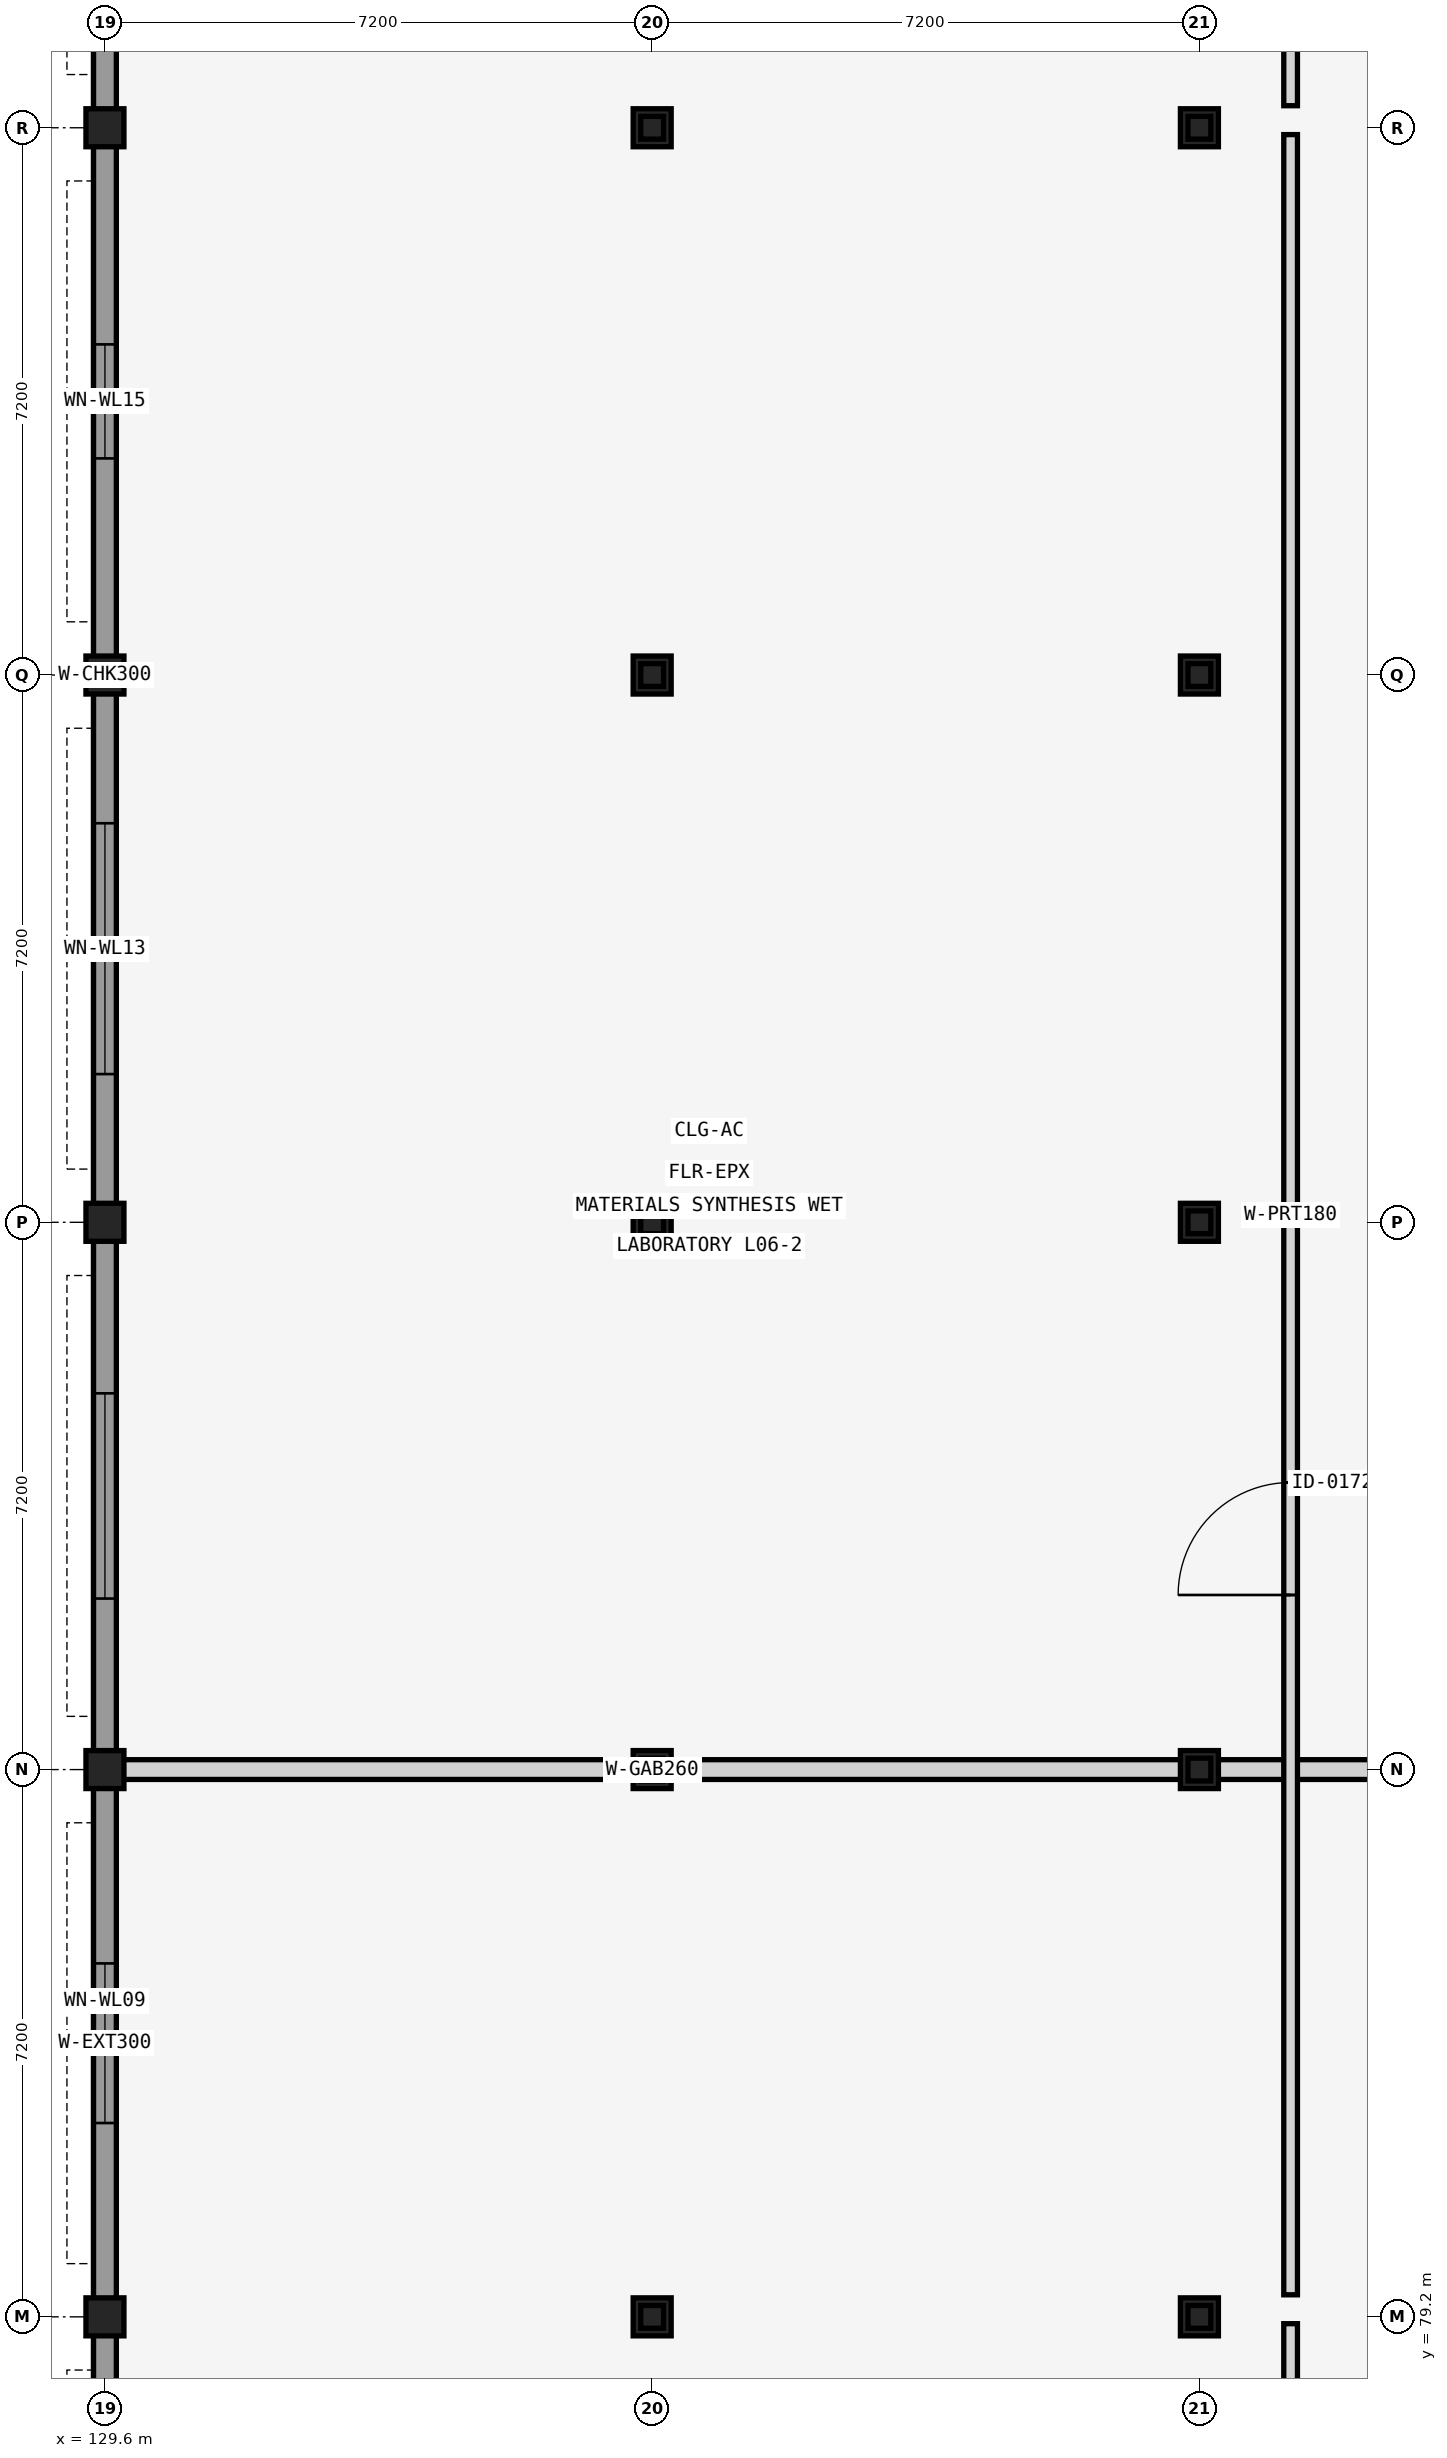
"""IFC4 building model, lengths in metres.
Left out: names, types, materials, properties, quantities, classifications, styles, units other than length and angle.
Written with IfcOpenShell. Run it as: python <this file> out.ifc"""

import sys

from ifc_helpers import new_model, si_unit, direction, frame, frame_2d, origin, origin_2d, place, context, subcontext, project, spatial, polyline, rectangle, i_section, outline, extrude, element, fill, save


model = new_model("IFC4")
c1 = context("Model", 3, precision=1e-05, world=origin(), true_north=direction((0.0, 1.0)))
c2 = subcontext(c1, "Body", "Model", "MODEL_VIEW")
j1 = project(units=[si_unit("LENGTHUNIT", "METRE"), si_unit("PLANEANGLEUNIT", "RADIAN")], contexts=[c1])
p1 = place(None, origin())
s1 = spatial("IfcSite", under=j1, at=p1, CompositionType="ELEMENT")
p2 = place(p1, origin())
s2 = spatial("IfcBuilding", under=s1, at=p2, CompositionType="ELEMENT")
p3 = place(p2, frame((0.0, 0.0, 25.6)))
s3 = spatial("IfcBuildingStorey", under=s2, at=p3, CompositionType="ELEMENT", Elevation=25.6)
for number, where, z_axis, x_axis in (
    (1, (129.6, 79.2, 0.0), (0.0, 0.0, 1.0), (1.0, 0.0, 0.0)),
    (2, (129.6, 86.4, 0.0), (0.0, 0.0, 1.0), (1.0, 0.0, 0.0)),
    (3, (129.6, 93.6, 0.0), (0.0, 0.0, 1.0), (1.0, 0.0, 0.0)),
    (4, (129.6, 100.8, 0.0), (0.0, 0.0, 1.0), (1.0, 0.0, 0.0)),
    (5, (129.6, 108.0, 0.0), (0.0, 0.0, 1.0), (1.0, 0.0, 0.0)),
    (6, (136.8, 79.2, 0.0), (0.0, 0.0, 1.0), (1.0, 0.0, 0.0)),
    (7, (136.8, 86.4, 0.0), (0.0, 0.0, 1.0), (1.0, 0.0, 0.0)),
    (8, (136.8, 93.6, 0.0), (0.0, 0.0, 1.0), (1.0, 0.0, 0.0)),
    (9, (136.8, 100.8, 0.0), (0.0, 0.0, 1.0), (1.0, 0.0, 0.0)),
    (10, (136.8, 108.0, 0.0), (0.0, 0.0, 1.0), (1.0, 0.0, 0.0)),
    (11, (144.0, 79.2, 0.0), (0.0, 0.0, 1.0), (1.0, 0.0, 0.0)),
    (12, (144.0, 86.4, 0.0), (0.0, 0.0, 1.0), (1.0, 0.0, 0.0)),
    (13, (144.0, 93.6, 0.0), (0.0, 0.0, 1.0), (1.0, 0.0, 0.0)),
    (14, (144.0, 100.8, 0.0), (0.0, 0.0, 1.0), (1.0, 0.0, 0.0)),
    (15, (144.0, 108.0, 0.0), (0.0, 0.0, 1.0), (1.0, 0.0, 0.0)),
):
    element("IfcColumn", number, at=place(p3, frame(where, z_axis=z_axis, x_axis=x_axis)), inside=s3, PredefinedType="COLUMN", context=c2, shape_type="SweptSolid", body=[
        extrude(rectangle(XDim=0.5, YDim=0.5, at=origin_2d()), origin(), (0.0, 0.0, 1.0), 4.16),
    ])
p4 = place(p3, frame((136.8, 79.2, 4.16), z_axis=(0.0, 0.0, 1.0), x_axis=(1.0, 0.0, 0.0)))
e16 = element("IfcColumn", 16, at=p4, inside=s3, PredefinedType="COLUMN", context=c2, shape_type="SweptSolid", body=[
    extrude(i_section(OverallWidth=0.3, OverallDepth=0.3, WebThickness=0.011, FlangeThickness=0.019, FilletRadius=0.027, at=origin_2d()), origin(), (0.0, 0.0, 1.0), 2.06),
])
p5 = place(p3, frame((136.8, 86.4, 4.16), z_axis=(0.0, 0.0, 1.0), x_axis=(1.0, 0.0, 0.0)))
e17 = element("IfcColumn", 17, at=p5, inside=s3, PredefinedType="COLUMN", context=c2, shape_type="SweptSolid", body=[
    extrude(i_section(OverallWidth=0.3, OverallDepth=0.3, WebThickness=0.011, FlangeThickness=0.019, FilletRadius=0.027, at=origin_2d()), origin(), (0.0, 0.0, 1.0), 2.84),
])
p6 = place(p3, frame((144.0, 79.2, 4.16), z_axis=(0.0, 0.0, 1.0), x_axis=(1.0, 0.0, 0.0)))
e18 = element("IfcColumn", 18, at=p6, inside=s3, PredefinedType="COLUMN", context=c2, shape_type="SweptSolid", body=[
    extrude(i_section(OverallWidth=0.3, OverallDepth=0.3, WebThickness=0.011, FlangeThickness=0.019, FilletRadius=0.027, at=origin_2d()), origin(), (0.0, 0.0, 1.0), 2.06),
])
p7 = place(p3, frame((144.0, 86.4, 4.16), z_axis=(0.0, 0.0, 1.0), x_axis=(1.0, 0.0, 0.0)))
e19 = element("IfcColumn", 19, at=p7, inside=s3, PredefinedType="COLUMN", context=c2, shape_type="SweptSolid", body=[
    extrude(i_section(OverallWidth=0.3, OverallDepth=0.3, WebThickness=0.011, FlangeThickness=0.019, FilletRadius=0.027, at=origin_2d()), origin(), (0.0, 0.0, 1.0), 2.84),
])
p8 = place(p3, frame((136.8, 93.6, 4.16), z_axis=(0.0, 0.0, 1.0), x_axis=(1.0, 0.0, 0.0)))
e20 = element("IfcColumn", 20, at=p8, inside=s3, PredefinedType="COLUMN", context=c2, shape_type="SweptSolid", body=[
    extrude(i_section(OverallWidth=0.3, OverallDepth=0.3, WebThickness=0.011, FlangeThickness=0.019, FilletRadius=0.027, at=origin_2d()), origin(), (0.0, 0.0, 1.0), 0.5),
])
p9 = place(p3, frame((136.8, 100.8, 4.16), z_axis=(0.0, 0.0, 1.0), x_axis=(1.0, 0.0, 0.0)))
e21 = element("IfcColumn", 21, at=p9, inside=s3, PredefinedType="COLUMN", context=c2, shape_type="SweptSolid", body=[
    extrude(i_section(OverallWidth=0.3, OverallDepth=0.3, WebThickness=0.011, FlangeThickness=0.019, FilletRadius=0.027, at=origin_2d()), origin(), (0.0, 0.0, 1.0), 1.28),
])
p10 = place(p3, frame((136.8, 108.0, 4.16), z_axis=(0.0, 0.0, 1.0), x_axis=(1.0, 0.0, 0.0)))
e22 = element("IfcColumn", 22, at=p10, inside=s3, PredefinedType="COLUMN", context=c2, shape_type="SweptSolid", body=[
    extrude(i_section(OverallWidth=0.3, OverallDepth=0.3, WebThickness=0.011, FlangeThickness=0.019, FilletRadius=0.027, at=origin_2d()), origin(), (0.0, 0.0, 1.0), 2.06),
])
p11 = place(p3, frame((144.0, 93.6, 4.16), z_axis=(0.0, 0.0, 1.0), x_axis=(1.0, 0.0, 0.0)))
e23 = element("IfcColumn", 23, at=p11, inside=s3, PredefinedType="COLUMN", context=c2, shape_type="SweptSolid", body=[
    extrude(i_section(OverallWidth=0.3, OverallDepth=0.3, WebThickness=0.011, FlangeThickness=0.019, FilletRadius=0.027, at=origin_2d()), origin(), (0.0, 0.0, 1.0), 0.5),
])
p12 = place(p3, frame((144.0, 100.8, 4.16), z_axis=(0.0, 0.0, 1.0), x_axis=(1.0, 0.0, 0.0)))
e24 = element("IfcColumn", 24, at=p12, inside=s3, PredefinedType="COLUMN", context=c2, shape_type="SweptSolid", body=[
    extrude(i_section(OverallWidth=0.3, OverallDepth=0.3, WebThickness=0.011, FlangeThickness=0.019, FilletRadius=0.027, at=origin_2d()), origin(), (0.0, 0.0, 1.0), 1.28),
])
p13 = place(p3, frame((144.0, 108.0, 4.16), z_axis=(0.0, 0.0, 1.0), x_axis=(1.0, 0.0, 0.0)))
e25 = element("IfcColumn", 25, at=p13, inside=s3, PredefinedType="COLUMN", context=c2, shape_type="SweptSolid", body=[
    extrude(i_section(OverallWidth=0.3, OverallDepth=0.3, WebThickness=0.011, FlangeThickness=0.019, FilletRadius=0.027, at=origin_2d()), origin(), (0.0, 0.0, 1.0), 2.06),
])
p14 = place(p3, frame((129.6, 72.24, 0.0), z_axis=(0.0, 0.0, 1.0), x_axis=(0.0, 1.0, 0.0)))
e26 = element("IfcWall", 26, at=p14, inside=s3, PredefinedType="SOLIDWALL", context=c2, shape_type="SweptSolid", body=[
    extrude(rectangle(XDim=6.72, YDim=0.3, at=frame_2d((3.36, 0.0))), origin(), (0.0, 0.0, 1.0), 3.55),
])
p15 = place(p14, frame((1.56, 0.0, 0.68)))
e27 = element("IfcOpeningElement", 27, at=p15, cuts=e26, PredefinedType="OPENING", context=c2, shape_type="SweptSolid", body=[
    extrude(rectangle(XDim=3.6, YDim=2.1, at=frame_2d((1.8, 1.05))), frame((0.0, 0.16, 0.0), z_axis=(0.0, -1.0, 0.0), x_axis=(1.0, 0.0, 0.0)), (0.0, 0.0, 1.0), 0.32),
])
p16 = place(p3, frame((129.6, 79.44, 0.0), z_axis=(0.0, 0.0, 1.0), x_axis=(0.0, 1.0, 0.0)))
e28 = element("IfcWall", 28, at=p16, inside=s3, PredefinedType="SOLIDWALL", context=c2, shape_type="SweptSolid", body=[
    extrude(rectangle(XDim=6.72, YDim=0.3, at=frame_2d((3.36, 0.0))), origin(), (0.0, 0.0, 1.0), 3.55),
])
p17 = place(p16, frame((2.31, 0.0, 0.68)))
e29 = element("IfcOpeningElement", 29, at=p17, cuts=e28, PredefinedType="OPENING", context=c2, shape_type="SweptSolid", body=[
    extrude(rectangle(XDim=2.1, YDim=1.8, at=frame_2d((1.05, 0.9))), frame((0.0, 0.16, 0.0), z_axis=(0.0, -1.0, 0.0), x_axis=(1.0, 0.0, 0.0)), (0.0, 0.0, 1.0), 0.32),
])
p18 = place(p3, frame((129.6, 86.64, 0.0), z_axis=(0.0, 0.0, 1.0), x_axis=(0.0, 1.0, 0.0)))
e30 = element("IfcWall", 30, at=p18, inside=s3, PredefinedType="SOLIDWALL", context=c2, shape_type="SweptSolid", body=[
    extrude(rectangle(XDim=6.72, YDim=0.3, at=frame_2d((3.36, 0.0))), origin(), (0.0, 0.0, 1.0), 3.55),
])
p19 = place(p18, frame((2.01, 0.0, 0.68)))
e31 = element("IfcOpeningElement", 31, at=p19, cuts=e30, PredefinedType="OPENING", context=c2, shape_type="SweptSolid", body=[
    extrude(rectangle(XDim=2.7, YDim=1.8, at=frame_2d((1.35, 0.9))), frame((0.0, 0.16, 0.0), z_axis=(0.0, -1.0, 0.0), x_axis=(1.0, 0.0, 0.0)), (0.0, 0.0, 1.0), 0.32),
])
p20 = place(p3, frame((129.6, 93.84, 0.0), z_axis=(0.0, 0.0, 1.0), x_axis=(0.0, 1.0, 0.0)))
e32 = element("IfcWall", 32, at=p20, inside=s3, PredefinedType="SOLIDWALL", context=c2, shape_type="SweptSolid", body=[
    extrude(rectangle(XDim=6.72, YDim=0.3, at=frame_2d((3.36, 0.0))), origin(), (0.0, 0.0, 1.0), 3.55),
])
p21 = place(p20, frame((1.71, 0.0, 0.68)))
e33 = element("IfcOpeningElement", 33, at=p21, cuts=e32, PredefinedType="OPENING", context=c2, shape_type="SweptSolid", body=[
    extrude(rectangle(XDim=3.3, YDim=1.8, at=frame_2d((1.65, 0.9))), frame((0.0, 0.16, 0.0), z_axis=(0.0, -1.0, 0.0), x_axis=(1.0, 0.0, 0.0)), (0.0, 0.0, 1.0), 0.32),
])
p22 = place(p3, frame((129.6, 101.04, 0.0), z_axis=(0.0, 0.0, 1.0), x_axis=(0.0, 1.0, 0.0)))
e34 = element("IfcWall", 34, at=p22, inside=s3, PredefinedType="SOLIDWALL", context=c2, shape_type="SweptSolid", body=[
    extrude(rectangle(XDim=6.72, YDim=0.3, at=frame_2d((3.36, 0.0))), origin(), (0.0, 0.0, 1.0), 3.55),
])
p23 = place(p22, frame((2.61, 0.0, 0.68)))
e35 = element("IfcOpeningElement", 35, at=p23, cuts=e34, PredefinedType="OPENING", context=c2, shape_type="SweptSolid", body=[
    extrude(rectangle(XDim=1.5, YDim=1.8, at=frame_2d((0.75, 0.9))), frame((0.0, 0.16, 0.0), z_axis=(0.0, -1.0, 0.0), x_axis=(1.0, 0.0, 0.0)), (0.0, 0.0, 1.0), 0.32),
])
p24 = place(p3, frame((129.6, 108.24, 0.0), z_axis=(0.0, 0.0, 1.0), x_axis=(0.0, 1.0, 0.0)))
e36 = element("IfcWall", 36, at=p24, inside=s3, PredefinedType="SOLIDWALL", context=c2, shape_type="SweptSolid", body=[
    extrude(rectangle(XDim=6.72, YDim=0.3, at=frame_2d((3.36, 0.0))), origin(), (0.0, 0.0, 1.0), 3.55),
])
p25 = place(p24, frame((2.385, 0.0, 0.68)))
e37 = element("IfcOpeningElement", 37, at=p25, cuts=e36, PredefinedType="OPENING", context=c2, shape_type="SweptSolid", body=[
    extrude(rectangle(XDim=1.95, YDim=1.95, at=frame_2d((0.975, 0.975))), frame((0.0, 0.16, 0.0), z_axis=(0.0, -1.0, 0.0), x_axis=(1.0, 0.0, 0.0)), (0.0, 0.0, 1.0), 0.32),
])
for number, where, z_axis, x_axis in (
    (38, (129.6, 86.4, 4.16), (0.0, 0.0, 1.0), (1.0, 0.0, 0.0)),
    (39, (144.0, 86.4, 4.16), (0.0, 0.0, 1.0), (1.0, 0.0, 0.0)),
):
    element("IfcWall", number, at=place(p3, frame(where, z_axis=z_axis, x_axis=x_axis)), inside=s3, PredefinedType="SOLIDWALL", context=c2, shape_type="SweptSolid", body=[
        extrude(rectangle(XDim=14.4, YDim=0.26, at=frame_2d((7.2, 0.0))), origin(), (0.0, 0.0, 1.0), 2.42),
    ])
p26 = place(p3, frame((129.6, 57.6, 4.16), z_axis=(0.0, 0.0, 1.0), x_axis=(0.0, 1.0, 0.0)))
e40 = element("IfcWall", 40, at=p26, inside=s3, PredefinedType="SHEAR", context=c2, shape_type="SweptSolid", body=[
    extrude(outline(polyline([(0.0, 0.0), (28.8, 0.0), (28.8, 0.12), (28.76, 3.12), (0.0, 0.12), (0.0, 0.0)])), frame((0.0, 0.15, 0.0), z_axis=(0.0, -1.0, 0.0), x_axis=(1.0, 0.0, 0.0)), (0.0, 0.0, 1.0), 0.3),
])
p27 = place(p3, frame((129.6, 86.4, 4.16), z_axis=(0.0, 0.0, 1.0), x_axis=(0.0, 1.0, 0.0)))
e41 = element("IfcWall", 41, at=p27, inside=s3, PredefinedType="SHEAR", context=c2, shape_type="SweptSolid", body=[
    extrude(outline(polyline([(0.0, 0.0), (28.8, 0.0), (28.8, 0.12), (28.76, 3.12), (0.0, 0.12), (0.0, 0.0)])), frame((0.0, 0.15, 0.0), z_axis=(0.0, -1.0, 0.0), x_axis=(1.0, 0.0, 0.0)), (0.0, 0.0, 1.0), 0.3),
])
p28 = place(p3, frame((145.2, 57.74, 0.0), z_axis=(0.0, 0.0, 1.0), x_axis=(0.0, 1.0, 0.0)))
e42 = element("IfcWall", 42, at=p28, inside=s3, PredefinedType="PARTITIONING", context=c2, shape_type="SweptSolid", body=[
    extrude(rectangle(XDim=21.37, YDim=0.18, at=frame_2d((10.685, 0.0))), origin(), (0.0, 0.0, 1.0), 3.81),
])
p29 = place(p28, frame((9.97, 0.0, 0.0)))
e43 = element("IfcOpeningElement", 43, at=p29, cuts=e42, PredefinedType="OPENING", context=c2, shape_type="SweptSolid", body=[
    extrude(rectangle(XDim=1.43, YDim=2.18, at=frame_2d((0.715, 1.09))), frame((0.0, 0.1, 0.0), z_axis=(0.0, -1.0, 0.0), x_axis=(1.0, 0.0, 0.0)), (0.0, 0.0, 1.0), 0.2),
])
p30 = place(p3, frame((145.2, 79.49, 0.0), z_axis=(0.0, 0.0, 1.0), x_axis=(0.0, 1.0, 0.0)))
e44 = element("IfcWall", 44, at=p30, inside=s3, PredefinedType="PARTITIONING", context=c2, shape_type="SweptSolid", body=[
    extrude(rectangle(XDim=28.42, YDim=0.18, at=frame_2d((14.21, 0.0))), origin(), (0.0, 0.0, 1.0), 3.81),
])
p31 = place(p30, frame((9.207, 0.0, 0.0)))
e45 = element("IfcOpeningElement", 45, at=p31, cuts=e44, PredefinedType="OPENING", context=c2, shape_type="SweptSolid", body=[
    extrude(rectangle(XDim=1.48, YDim=2.18, at=frame_2d((0.74, 1.09))), frame((0.0, 0.1, 0.0), z_axis=(0.0, -1.0, 0.0), x_axis=(1.0, 0.0, 0.0)), (0.0, 0.0, 1.0), 0.2),
])
p32 = place(p3, frame((145.2, 108.29, 0.0), z_axis=(0.0, 0.0, 1.0), x_axis=(0.0, 1.0, 0.0)))
e46 = element("IfcWall", 46, at=p32, inside=s3, PredefinedType="PARTITIONING", context=c2, shape_type="SweptSolid", body=[
    extrude(rectangle(XDim=6.74, YDim=0.18, at=frame_2d((3.37, 0.0))), origin(), (0.0, 0.0, 1.0), 3.81),
])
p33 = place(p32, frame((2.605, 0.0, 0.0)))
e47 = element("IfcOpeningElement", 47, at=p33, cuts=e46, PredefinedType="OPENING", context=c2, shape_type="SweptSolid", body=[
    extrude(rectangle(XDim=1.53, YDim=2.18, at=frame_2d((0.765, 1.09))), frame((0.0, 0.1, 0.0), z_axis=(0.0, -1.0, 0.0), x_axis=(1.0, 0.0, 0.0)), (0.0, 0.0, 1.0), 0.2),
])
p34 = place(p17, origin())
e48 = element("IfcWindow", 48, at=p34, inside=s3, PartitioningType="SINGLE_PANEL", PredefinedType="WINDOW", context=c2, shape_type="SweptSolid", body=[
    extrude(rectangle(XDim=2.1, YDim=1.8, at=frame_2d((1.05, 0.9))), frame((0.0, 0.03, 0.0), z_axis=(0.0, -1.0, 0.0), x_axis=(1.0, 0.0, 0.0)), (0.0, 0.0, 1.0), 0.06),
])
fill(e29, e48)
p35 = place(p19, origin())
e49 = element("IfcWindow", 49, at=p35, inside=s3, PartitioningType="SINGLE_PANEL", PredefinedType="WINDOW", context=c2, shape_type="SweptSolid", body=[
    extrude(rectangle(XDim=2.7, YDim=1.8, at=frame_2d((1.35, 0.9))), frame((0.0, 0.03, 0.0), z_axis=(0.0, -1.0, 0.0), x_axis=(1.0, 0.0, 0.0)), (0.0, 0.0, 1.0), 0.06),
])
fill(e31, e49)
p36 = place(p21, origin())
e50 = element("IfcWindow", 50, at=p36, inside=s3, PartitioningType="SINGLE_PANEL", PredefinedType="WINDOW", context=c2, shape_type="SweptSolid", body=[
    extrude(rectangle(XDim=3.3, YDim=1.8, at=frame_2d((1.65, 0.9))), frame((0.0, 0.03, 0.0), z_axis=(0.0, -1.0, 0.0), x_axis=(1.0, 0.0, 0.0)), (0.0, 0.0, 1.0), 0.06),
])
fill(e33, e50)
p37 = place(p23, origin())
e51 = element("IfcWindow", 51, at=p37, inside=s3, PartitioningType="SINGLE_PANEL", PredefinedType="WINDOW", context=c2, shape_type="SweptSolid", body=[
    extrude(rectangle(XDim=1.5, YDim=1.8, at=frame_2d((0.75, 0.9))), frame((0.0, 0.03, 0.0), z_axis=(0.0, -1.0, 0.0), x_axis=(1.0, 0.0, 0.0)), (0.0, 0.0, 1.0), 0.06),
])
fill(e35, e51)
p38 = place(p31, origin())
e52 = element("IfcDoor", 52, at=p38, inside=s3, OperationType="SINGLE_SWING_LEFT", PredefinedType="DOOR", context=c2, shape_type="SweptSolid", body=[
    extrude(rectangle(XDim=1.48, YDim=2.18, at=frame_2d((0.74, 1.09))), frame((0.0, 0.025, 0.0), z_axis=(0.0, -1.0, 0.0), x_axis=(1.0, 0.0, 0.0)), (0.0, 0.0, 1.0), 0.05),
])
fill(e45, e52)
save(model, sys.argv[1])
